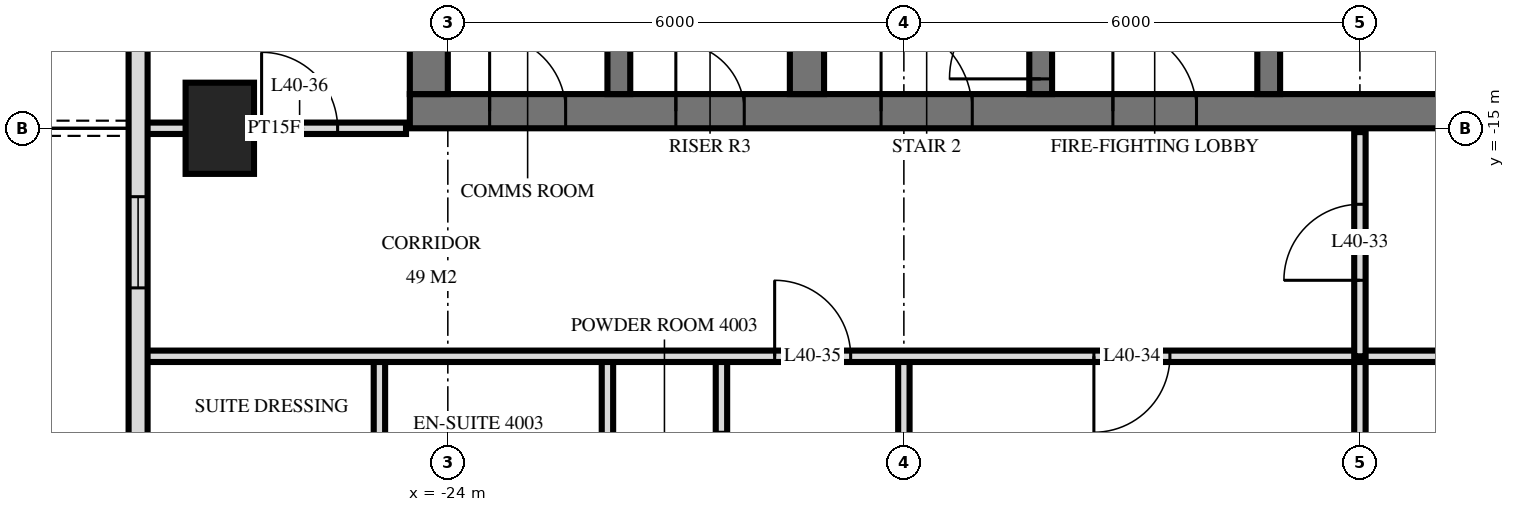
"""IFC4 building model, lengths in metres.
Left out: names, types, materials, properties, quantities, classifications, styles, units other than length and angle.
Written with IfcOpenShell. Run it as: python <this file> out.ifc"""

import sys

from ifc_helpers import new_model, si_unit, direction, frame, frame_2d, origin, origin_2d, place, context, subcontext, project, spatial, rectangle, extrude, element, fill, save


model = new_model("IFC4")
c1 = context("Model", 3, precision=1e-05, world=origin(), true_north=direction((0.0, 1.0)))
c2 = subcontext(c1, "Body", "Model", "MODEL_VIEW")
j1 = project(units=[si_unit("LENGTHUNIT", "METRE"), si_unit("PLANEANGLEUNIT", "RADIAN")], contexts=[c1])
p1 = place(None, origin())
s1 = spatial("IfcSite", under=j1, at=p1, CompositionType="ELEMENT")
p2 = place(p1, origin())
s2 = spatial("IfcBuilding", under=s1, at=p2, CompositionType="ELEMENT")
p3 = place(p2, frame((0.0, 0.0, 156.0)))
s3 = spatial("IfcBuildingStorey", under=s2, at=p3, CompositionType="ELEMENT", Elevation=156.0)
p4 = place(p3, frame((-27.0, -15.0, 0.0), z_axis=(0.0, 0.0, 1.0), x_axis=(0.0, 1.0, 0.0)))
e1 = element("IfcColumn", 1, at=p4, inside=s3, PredefinedType="COLUMN", context=c2, shape_type="SweptSolid", body=[
    extrude(rectangle(XDim=1.2, YDim=0.9, at=origin_2d()), origin(), (0.0, 0.0, 1.0), 3.6),
])
p5 = place(p3, frame((-24.5, -14.775, 0.0), z_axis=(0.0, 0.0, 1.0), x_axis=(1.0, 0.0, 0.0)))
e2 = element("IfcWall", 2, at=p5, inside=s3, PredefinedType="SHEAR", context=c2, shape_type="SweptSolid", body=[
    extrude(rectangle(XDim=14.5, YDim=0.45, at=frame_2d((7.25, 0.0))), origin(), (0.0, 0.0, 1.0), 3.6),
])
p6 = place(p5, frame((6.2, 0.0, 0.0)))
e3 = element("IfcOpeningElement", 3, at=p6, cuts=e2, PredefinedType="OPENING", context=c2, shape_type="SweptSolid", body=[
    extrude(rectangle(XDim=1.2, YDim=2.1, at=frame_2d((0.6, 1.05))), frame((0.0, 0.235, 0.0), z_axis=(0.0, -1.0, 0.0), x_axis=(1.0, 0.0, 0.0)), (0.0, 0.0, 1.0), 0.47),
])
p7 = place(p5, frame((9.25, 0.0, 0.0)))
e4 = element("IfcOpeningElement", 4, at=p7, cuts=e2, PredefinedType="OPENING", context=c2, shape_type="SweptSolid", body=[
    extrude(rectangle(XDim=1.1, YDim=2.1, at=frame_2d((0.55, 1.05))), frame((0.0, 0.235, 0.0), z_axis=(0.0, -1.0, 0.0), x_axis=(1.0, 0.0, 0.0)), (0.0, 0.0, 1.0), 0.47),
])
p8 = place(p5, frame((3.5, 0.0, 0.0)))
e5 = element("IfcOpeningElement", 5, at=p8, cuts=e2, PredefinedType="OPENING", context=c2, shape_type="SweptSolid", body=[
    extrude(rectangle(XDim=0.9, YDim=2.1, at=frame_2d((0.45, 1.05))), frame((0.0, 0.235, 0.0), z_axis=(0.0, -1.0, 0.0), x_axis=(1.0, 0.0, 0.0)), (0.0, 0.0, 1.0), 0.47),
])
p9 = place(p5, frame((1.05, 0.0, 0.0)))
e6 = element("IfcOpeningElement", 6, at=p9, cuts=e2, PredefinedType="OPENING", context=c2, shape_type="SweptSolid", body=[
    extrude(rectangle(XDim=1.0, YDim=2.1, at=frame_2d((0.5, 1.05))), frame((0.0, 0.235, 0.0), z_axis=(0.0, -1.0, 0.0), x_axis=(1.0, 0.0, 0.0)), (0.0, 0.0, 1.0), 0.47),
])
p10 = place(p3, frame((-24.25, -14.55, 0.0), z_axis=(0.0, 0.0, 1.0), x_axis=(0.0, 1.0, 0.0)))
e7 = element("IfcWall", 7, at=p10, inside=s3, PredefinedType="SHEAR", context=c2, shape_type="SweptSolid", body=[
    extrude(rectangle(XDim=14.1, YDim=0.5, at=frame_2d((7.05, 0.0))), origin(), (0.0, 0.0, 1.0), 3.6),
])
p11 = place(p3, frame((-13.2, -14.55, 0.0), z_axis=(0.0, 0.0, 1.0), x_axis=(0.0, 1.0, 0.0)))
e8 = element("IfcWall", 8, at=p11, inside=s3, PredefinedType="SHEAR", context=c2, shape_type="SweptSolid", body=[
    extrude(rectangle(XDim=5.4, YDim=0.3, at=frame_2d((2.7, 0.0))), origin(), (0.0, 0.0, 1.0), 3.6),
])
p12 = place(p11, frame((4.0, 0.0, 0.0)))
e9 = element("IfcOpeningElement", 9, at=p12, cuts=e8, PredefinedType="OPENING", context=c2, shape_type="SweptSolid", body=[
    extrude(rectangle(XDim=1.2, YDim=2.1, at=frame_2d((0.6, 1.05))), frame((0.0, 0.16, 0.0), z_axis=(0.0, -1.0, 0.0), x_axis=(1.0, 0.0, 0.0)), (0.0, 0.0, 1.0), 0.32),
])
p13 = place(p3, frame((-16.2, -14.55, 0.0), z_axis=(0.0, 0.0, 1.0), x_axis=(0.0, 1.0, 0.0)))
e10 = element("IfcWall", 10, at=p13, inside=s3, PredefinedType="SHEAR", context=c2, shape_type="SweptSolid", body=[
    extrude(rectangle(XDim=5.4, YDim=0.3, at=frame_2d((2.7, 0.0))), origin(), (0.0, 0.0, 1.0), 3.6),
])
p14 = place(p13, frame((0.2, 0.0, 0.0)))
e11 = element("IfcOpeningElement", 11, at=p14, cuts=e10, PredefinedType="OPENING", context=c2, shape_type="SweptSolid", body=[
    extrude(rectangle(XDim=1.2, YDim=2.1, at=frame_2d((0.6, 1.05))), frame((0.0, 0.16, 0.0), z_axis=(0.0, -1.0, 0.0), x_axis=(1.0, 0.0, 0.0)), (0.0, 0.0, 1.0), 0.32),
])
p15 = place(p3, frame((-19.275, -14.55, 0.0), z_axis=(0.0, 0.0, 1.0), x_axis=(0.0, 1.0, 0.0)))
e12 = element("IfcWall", 12, at=p15, inside=s3, PredefinedType="SHEAR", context=c2, shape_type="SweptSolid", body=[
    extrude(rectangle(XDim=5.4, YDim=0.45, at=frame_2d((2.7, 0.0))), origin(), (0.0, 0.0, 1.0), 3.6),
])
p16 = place(p3, frame((-21.75, -14.55, 0.0), z_axis=(0.0, 0.0, 1.0), x_axis=(0.0, 1.0, 0.0)))
e13 = element("IfcWall", 13, at=p16, inside=s3, PredefinedType="SHEAR", context=c2, shape_type="SweptSolid", body=[
    extrude(rectangle(XDim=5.4, YDim=0.3, at=frame_2d((2.7, 0.0))), origin(), (0.0, 0.0, 1.0), 3.6),
])
p17 = place(p3, frame((-28.075, -3.325, 0.0), z_axis=(0.0, 0.0, 1.0), x_axis=(0.0, -1.0, 0.0)))
e14 = element("IfcWall", 14, at=p17, inside=s3, PredefinedType="SOLIDWALL", context=c2, shape_type="SweptSolid", body=[
    extrude(rectangle(XDim=25.951, YDim=0.25, at=frame_2d((12.975, 0.0))), origin(), (0.0, 0.0, 1.0), 3.32),
])
p18 = place(p17, frame((6.65, 0.0, 0.0)))
e15 = element("IfcOpeningElement", 15, at=p18, cuts=e14, PredefinedType="OPENING", context=c2, shape_type="SweptSolid", body=[
    extrude(rectangle(XDim=1.8, YDim=2.4, at=frame_2d((0.9, 1.2))), frame((0.0, 0.135, 0.0), z_axis=(0.0, -1.0, 0.0), x_axis=(1.0, 0.0, 0.0)), (0.0, 0.0, 1.0), 0.27),
])
p19 = place(p17, frame((12.575, 0.0, 0.3)))
e16 = element("IfcOpeningElement", 16, at=p19, cuts=e14, PredefinedType="OPENING", context=c2, shape_type="SweptSolid", body=[
    extrude(rectangle(XDim=1.2, YDim=2.1, at=frame_2d((0.6, 1.05))), frame((0.0, 0.135, 0.0), z_axis=(0.0, -1.0, 0.0), x_axis=(1.0, 0.0, 0.0)), (0.0, 0.0, 1.0), 0.27),
])
p20 = place(p17, frame((18.175, 0.0, 0.0)))
e17 = element("IfcOpeningElement", 17, at=p20, cuts=e14, PredefinedType="OPENING", context=c2, shape_type="SweptSolid", body=[
    extrude(rectangle(XDim=1.8, YDim=2.4, at=frame_2d((0.9, 1.2))), frame((0.0, 0.135, 0.0), z_axis=(0.0, -1.0, 0.0), x_axis=(1.0, 0.0, 0.0)), (0.0, 0.0, 1.0), 0.27),
])
p21 = place(p17, frame((21.075, 0.0, 0.0)))
e18 = element("IfcOpeningElement", 18, at=p21, cuts=e14, PredefinedType="OPENING", context=c2, shape_type="SweptSolid", body=[
    extrude(rectangle(XDim=1.8, YDim=2.4, at=frame_2d((0.9, 1.2))), frame((0.0, 0.135, 0.0), z_axis=(0.0, -1.0, 0.0), x_axis=(1.0, 0.0, 0.0)), (0.0, 0.0, 1.0), 0.27),
])
p22 = place(p17, frame((23.825, 0.0, 0.3)))
e19 = element("IfcOpeningElement", 19, at=p22, cuts=e14, PredefinedType="OPENING", context=c2, shape_type="SweptSolid", body=[
    extrude(rectangle(XDim=1.8, YDim=2.1, at=frame_2d((0.9, 1.05))), frame((0.0, 0.135, 0.0), z_axis=(0.0, -1.0, 0.0), x_axis=(1.0, 0.0, 0.0)), (0.0, 0.0, 1.0), 0.27),
])
p23 = place(p3, frame((-12.0, -18.0, 0.0), z_axis=(0.0, 0.0, 1.0), x_axis=(0.0, 1.0, 0.0)))
e20 = element("IfcWall", 20, at=p23, inside=s3, PredefinedType="PARTITIONING", context=c2, shape_type="SweptSolid", body=[
    extrude(rectangle(XDim=2.95, YDim=0.15, at=frame_2d((1.475, 0.0))), origin(), (0.0, 0.0, 1.0), 3.32),
])
p24 = place(p23, frame((1.0, 0.0, 0.0)))
e21 = element("IfcOpeningElement", 21, at=p24, cuts=e20, PredefinedType="OPENING", context=c2, shape_type="SweptSolid", body=[
    extrude(rectangle(XDim=1.0, YDim=2.1, at=frame_2d((0.5, 1.05))), frame((0.0, 0.085, 0.0), z_axis=(0.0, -1.0, 0.0), x_axis=(1.0, 0.0, 0.0)), (0.0, 0.0, 1.0), 0.17),
])
p25 = place(p3, frame((-12.0, -33.62, 0.0), z_axis=(0.0, 0.0, 1.0), x_axis=(0.0, 1.0, 0.0)))
e22 = element("IfcWall", 22, at=p25, inside=s3, PredefinedType="PARTITIONING", context=c2, shape_type="SweptSolid", body=[
    extrude(rectangle(XDim=15.62, YDim=0.15, at=frame_2d((7.81, 0.0))), origin(), (0.0, 0.0, 1.0), 3.32),
])
p26 = place(p3, frame((-18.0, -21.0, 0.0), z_axis=(0.0, 0.0, 1.0), x_axis=(0.0, 1.0, 0.0)))
e23 = element("IfcWall", 23, at=p26, inside=s3, PredefinedType="PARTITIONING", context=c2, shape_type="SweptSolid", body=[
    extrude(rectangle(XDim=3.0, YDim=0.15, at=frame_2d((1.5, 0.0))), origin(), (0.0, 0.0, 1.0), 3.32),
])
p27 = place(p3, frame((-20.4, -21.0, 0.0), z_axis=(0.0, 0.0, 1.0), x_axis=(0.0, 1.0, 0.0)))
e24 = element("IfcWall", 24, at=p27, inside=s3, PredefinedType="PARTITIONING", context=c2, shape_type="SweptSolid", body=[
    extrude(rectangle(XDim=3.0, YDim=0.15, at=frame_2d((1.5, 0.0))), origin(), (0.0, 0.0, 1.0), 3.32),
])
p28 = place(p27, frame((1.0, 0.0, 0.0)))
e25 = element("IfcOpeningElement", 25, at=p28, cuts=e24, PredefinedType="OPENING", context=c2, shape_type="SweptSolid", body=[
    extrude(rectangle(XDim=1.0, YDim=2.1, at=frame_2d((0.5, 1.05))), frame((0.0, 0.085, 0.0), z_axis=(0.0, -1.0, 0.0), x_axis=(1.0, 0.0, 0.0)), (0.0, 0.0, 1.0), 0.17),
])
p29 = place(p3, frame((-21.9, -21.0, 0.0), z_axis=(0.0, 0.0, 1.0), x_axis=(0.0, 1.0, 0.0)))
e26 = element("IfcWall", 26, at=p29, inside=s3, PredefinedType="PLUMBINGWALL", context=c2, shape_type="SweptSolid", body=[
    extrude(rectangle(XDim=3.0, YDim=0.15, at=frame_2d((1.5, 0.0))), origin(), (0.0, 0.0, 1.0), 3.32),
])
p30 = place(p3, frame((-24.9, -21.0, 0.0), z_axis=(0.0, 0.0, 1.0), x_axis=(0.0, 1.0, 0.0)))
e27 = element("IfcWall", 27, at=p30, inside=s3, PredefinedType="PARTITIONING", context=c2, shape_type="SweptSolid", body=[
    extrude(rectangle(XDim=3.0, YDim=0.15, at=frame_2d((1.5, 0.0))), origin(), (0.0, 0.0, 1.0), 3.32),
])
p31 = place(p3, frame((-28.02, -18.0, 0.0), z_axis=(0.0, 0.0, 1.0), x_axis=(1.0, 0.0, 0.0)))
e28 = element("IfcWall", 28, at=p31, inside=s3, PredefinedType="PARTITIONING", context=c2, shape_type="SweptSolid", body=[
    extrude(rectangle(XDim=56.04, YDim=0.15, at=frame_2d((28.02, 0.0))), origin(), (0.0, 0.0, 1.0), 3.32),
])
p32 = place(p31, frame((12.52, 0.0, 0.0)))
e29 = element("IfcOpeningElement", 29, at=p32, cuts=e28, PredefinedType="OPENING", context=c2, shape_type="SweptSolid", body=[
    extrude(rectangle(XDim=1.0, YDim=2.1, at=frame_2d((0.5, 1.05))), frame((0.0, 0.085, 0.0), z_axis=(0.0, -1.0, 0.0), x_axis=(1.0, 0.0, 0.0)), (0.0, 0.0, 1.0), 0.17),
])
p33 = place(p31, frame((8.32, 0.0, 0.0)))
e30 = element("IfcOpeningElement", 30, at=p33, cuts=e28, PredefinedType="OPENING", context=c2, shape_type="SweptSolid", body=[
    extrude(rectangle(XDim=1.0, YDim=2.1, at=frame_2d((0.5, 1.05))), frame((0.0, 0.085, 0.0), z_axis=(0.0, -1.0, 0.0), x_axis=(1.0, 0.0, 0.0)), (0.0, 0.0, 1.0), 0.17),
])
p34 = place(p31, frame((40.17, 0.0, 0.0)))
e31 = element("IfcOpeningElement", 31, at=p34, cuts=e28, PredefinedType="OPENING", context=c2, shape_type="SweptSolid", body=[
    extrude(rectangle(XDim=1.0, YDim=2.1, at=frame_2d((0.5, 1.05))), frame((0.0, 0.085, 0.0), z_axis=(0.0, -1.0, 0.0), x_axis=(1.0, 0.0, 0.0)), (0.0, 0.0, 1.0), 0.17),
])
p35 = place(p31, frame((44.87, 0.0, 0.0)))
e32 = element("IfcOpeningElement", 32, at=p35, cuts=e28, PredefinedType="OPENING", context=c2, shape_type="SweptSolid", body=[
    extrude(rectangle(XDim=1.0, YDim=2.1, at=frame_2d((0.5, 1.05))), frame((0.0, 0.085, 0.0), z_axis=(0.0, -1.0, 0.0), x_axis=(1.0, 0.0, 0.0)), (0.0, 0.0, 1.0), 0.17),
])
p36 = place(p31, frame((46.72, 0.0, 0.0)))
e33 = element("IfcOpeningElement", 33, at=p36, cuts=e28, PredefinedType="OPENING", context=c2, shape_type="SweptSolid", body=[
    extrude(rectangle(XDim=1.0, YDim=2.1, at=frame_2d((0.5, 1.05))), frame((0.0, 0.085, 0.0), z_axis=(0.0, -1.0, 0.0), x_axis=(1.0, 0.0, 0.0)), (0.0, 0.0, 1.0), 0.17),
])
p37 = place(p31, frame((18.52, 0.0, 0.0)))
e34 = element("IfcOpeningElement", 34, at=p37, cuts=e28, PredefinedType="OPENING", context=c2, shape_type="SweptSolid", body=[
    extrude(rectangle(XDim=1.0, YDim=2.1, at=frame_2d((0.5, 1.05))), frame((0.0, 0.085, 0.0), z_axis=(0.0, -1.0, 0.0), x_axis=(1.0, 0.0, 0.0)), (0.0, 0.0, 1.0), 0.17),
])
p38 = place(p31, frame((24.52, 0.0, 0.0)))
e35 = element("IfcOpeningElement", 35, at=p38, cuts=e28, PredefinedType="OPENING", context=c2, shape_type="SweptSolid", body=[
    extrude(rectangle(XDim=1.0, YDim=2.1, at=frame_2d((0.5, 1.05))), frame((0.0, 0.085, 0.0), z_axis=(0.0, -1.0, 0.0), x_axis=(1.0, 0.0, 0.0)), (0.0, 0.0, 1.0), 0.17),
])
p39 = place(p31, frame((30.52, 0.0, 0.0)))
e36 = element("IfcOpeningElement", 36, at=p39, cuts=e28, PredefinedType="OPENING", context=c2, shape_type="SweptSolid", body=[
    extrude(rectangle(XDim=1.0, YDim=2.1, at=frame_2d((0.5, 1.05))), frame((0.0, 0.085, 0.0), z_axis=(0.0, -1.0, 0.0), x_axis=(1.0, 0.0, 0.0)), (0.0, 0.0, 1.0), 0.17),
])
p40 = place(p31, frame((36.52, 0.0, 0.0)))
e37 = element("IfcOpeningElement", 37, at=p40, cuts=e28, PredefinedType="OPENING", context=c2, shape_type="SweptSolid", body=[
    extrude(rectangle(XDim=1.0, YDim=2.1, at=frame_2d((0.5, 1.05))), frame((0.0, 0.085, 0.0), z_axis=(0.0, -1.0, 0.0), x_axis=(1.0, 0.0, 0.0)), (0.0, 0.0, 1.0), 0.17),
])
p41 = place(p3, frame((-28.02, -15.0, 0.0), z_axis=(0.0, 0.0, 1.0), x_axis=(1.0, 0.0, 0.0)))
e38 = element("IfcWall", 38, at=p41, inside=s3, PredefinedType="PARTITIONING", context=c2, shape_type="SweptSolid", body=[
    extrude(rectangle(XDim=3.47, YDim=0.15, at=frame_2d((1.735, 0.0))), origin(), (0.0, 0.0, 1.0), 3.32),
])
p42 = place(p41, frame((1.57, 0.0, 0.0)))
e39 = element("IfcOpeningElement", 39, at=p42, cuts=e38, PredefinedType="OPENING", context=c2, shape_type="SweptSolid", body=[
    extrude(rectangle(XDim=1.0, YDim=2.1, at=frame_2d((0.5, 1.05))), frame((0.0, 0.085, 0.0), z_axis=(0.0, -1.0, 0.0), x_axis=(1.0, 0.0, 0.0)), (0.0, 0.0, 1.0), 0.17),
])
p43 = place(p19, origin())
e40 = element("IfcWindow", 40, at=p43, inside=s3, PartitioningType="SINGLE_PANEL", PredefinedType="WINDOW", context=c2, shape_type="SweptSolid", body=[
    extrude(rectangle(XDim=1.2, YDim=2.1, at=frame_2d((0.6, 1.05))), frame((0.0, 0.03, 0.0), z_axis=(0.0, -1.0, 0.0), x_axis=(1.0, 0.0, 0.0)), (0.0, 0.0, 1.0), 0.06),
])
fill(e16, e40)
p44 = place(p6, origin())
e41 = element("IfcDoor", 41, at=p44, inside=s3, OperationType="SINGLE_SWING_RIGHT", PredefinedType="DOOR", context=c2, shape_type="SweptSolid", body=[
    extrude(rectangle(XDim=1.2, YDim=2.1, at=frame_2d((0.6, 1.05))), frame((0.0, 0.025, 0.0), z_axis=(0.0, -1.0, 0.0), x_axis=(1.0, 0.0, 0.0)), (0.0, 0.0, 1.0), 0.05),
])
fill(e3, e41)
p45 = place(p7, origin())
e42 = element("IfcDoor", 42, at=p45, inside=s3, OperationType="SINGLE_SWING_RIGHT", PredefinedType="DOOR", context=c2, shape_type="SweptSolid", body=[
    extrude(rectangle(XDim=1.1, YDim=2.1, at=frame_2d((0.55, 1.05))), frame((0.0, 0.025, 0.0), z_axis=(0.0, -1.0, 0.0), x_axis=(1.0, 0.0, 0.0)), (0.0, 0.0, 1.0), 0.05),
])
fill(e4, e42)
p46 = place(p8, origin())
e43 = element("IfcDoor", 43, at=p46, inside=s3, OperationType="SINGLE_SWING_RIGHT", PredefinedType="DOOR", context=c2, shape_type="SweptSolid", body=[
    extrude(rectangle(XDim=0.9, YDim=2.1, at=frame_2d((0.45, 1.05))), frame((0.0, 0.025, 0.0), z_axis=(0.0, -1.0, 0.0), x_axis=(1.0, 0.0, 0.0)), (0.0, 0.0, 1.0), 0.05),
])
fill(e5, e43)
p47 = place(p9, origin())
e44 = element("IfcDoor", 44, at=p47, inside=s3, OperationType="SINGLE_SWING_RIGHT", PredefinedType="DOOR", context=c2, shape_type="SweptSolid", body=[
    extrude(rectangle(XDim=1.0, YDim=2.1, at=frame_2d((0.5, 1.05))), frame((0.0, 0.025, 0.0), z_axis=(0.0, -1.0, 0.0), x_axis=(1.0, 0.0, 0.0)), (0.0, 0.0, 1.0), 0.05),
])
fill(e6, e44)
p48 = place(p14, origin())
e45 = element("IfcDoor", 45, at=p48, inside=s3, OperationType="SINGLE_SWING_RIGHT", PredefinedType="DOOR", context=c2, shape_type="SweptSolid", body=[
    extrude(rectangle(XDim=1.2, YDim=2.1, at=frame_2d((0.6, 1.05))), frame((0.0, 0.025, 0.0), z_axis=(0.0, -1.0, 0.0), x_axis=(1.0, 0.0, 0.0)), (0.0, 0.0, 1.0), 0.05),
])
fill(e11, e45)
p49 = place(p24, origin())
e46 = element("IfcDoor", 46, at=p49, inside=s3, OperationType="SINGLE_SWING_RIGHT", PredefinedType="DOOR", context=c2, shape_type="SweptSolid", body=[
    extrude(rectangle(XDim=1.0, YDim=2.1, at=frame_2d((0.5, 1.05))), frame((0.0, 0.025, 0.0), z_axis=(0.0, -1.0, 0.0), x_axis=(1.0, 0.0, 0.0)), (0.0, 0.0, 1.0), 0.05),
])
fill(e21, e46)
p50 = place(p32, frame((0.5, 0.0, 0.0), z_axis=(0.0, 0.0, 1.0), x_axis=(-1.0, 0.0, 0.0)))
e47 = element("IfcDoor", 47, at=p50, inside=s3, OperationType="SINGLE_SWING_LEFT", PredefinedType="DOOR", context=c2, shape_type="SweptSolid", body=[
    extrude(rectangle(XDim=1.0, YDim=2.1, at=frame_2d((0.0, 1.05))), frame((0.0, -0.025, 0.0), z_axis=(0.0, 1.0, 0.0), x_axis=(-1.0, 0.0, 0.0)), (0.0, 0.0, 1.0), 0.05),
])
fill(e29, e47)
p51 = place(p33, origin())
e48 = element("IfcDoor", 48, at=p51, inside=s3, OperationType="SINGLE_SWING_RIGHT", PredefinedType="DOOR", context=c2, shape_type="SweptSolid", body=[
    extrude(rectangle(XDim=1.0, YDim=2.1, at=frame_2d((0.5, 1.05))), frame((0.0, 0.025, 0.0), z_axis=(0.0, -1.0, 0.0), x_axis=(1.0, 0.0, 0.0)), (0.0, 0.0, 1.0), 0.05),
])
fill(e30, e48)
p52 = place(p42, origin())
e49 = element("IfcDoor", 49, at=p52, inside=s3, OperationType="SINGLE_SWING_RIGHT", PredefinedType="DOOR", context=c2, shape_type="SweptSolid", body=[
    extrude(rectangle(XDim=1.0, YDim=2.1, at=frame_2d((0.5, 1.05))), frame((0.0, 0.025, 0.0), z_axis=(0.0, -1.0, 0.0), x_axis=(1.0, 0.0, 0.0)), (0.0, 0.0, 1.0), 0.05),
])
fill(e39, e49)
save(model, sys.argv[1])
